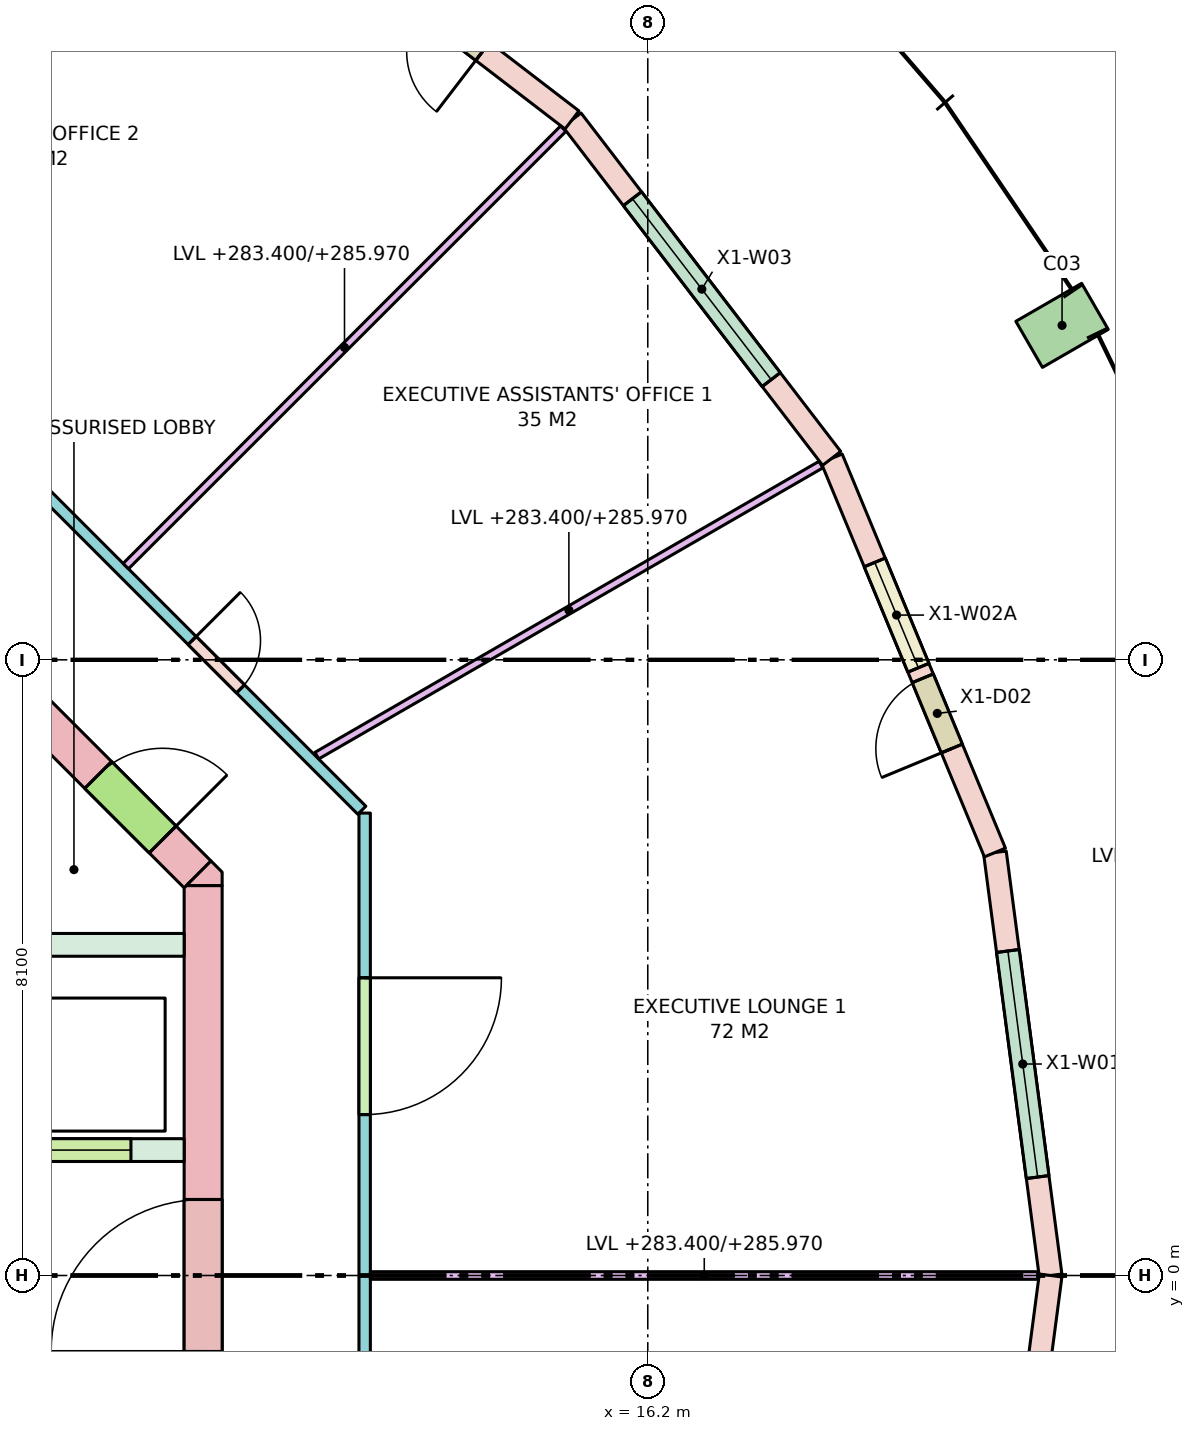
"""IFC4 building model, lengths in metres.
Left out: names, types, materials, properties, quantities, classifications, styles, units other than length and angle.
Written with IfcOpenShell. Run it as: python <this file> out.ifc"""

import sys

from ifc_helpers import new_model, si_unit, direction, frame, frame_2d, origin, origin_2d, place, context, subcontext, project, spatial, polyline, rectangle, outline, extrude, element, fill, save


model = new_model("IFC4")
c1 = context("Model", 3, precision=1e-05, world=origin(), true_north=direction((0.0, 1.0)))
c2 = subcontext(c1, "Body", "Model", "MODEL_VIEW")
j1 = project(units=[si_unit("LENGTHUNIT", "METRE"), si_unit("PLANEANGLEUNIT", "RADIAN")], contexts=[c1])
p1 = place(None, origin())
s1 = spatial("IfcSite", under=j1, at=p1, CompositionType="ELEMENT")
p2 = place(p1, origin())
s2 = spatial("IfcBuilding", under=s1, at=p2, CompositionType="ELEMENT")
p3 = place(p2, frame((0.0, 0.0, 283.4)))
s3 = spatial("IfcBuildingStorey", under=s2, at=p3, CompositionType="ELEMENT", Elevation=283.4)
p4 = place(p3, frame((21.651, 12.5, 0.0), z_axis=(0.0, 0.0, 1.0), x_axis=(-0.5, 0.866025403784, 0.0)))
e1 = element("IfcColumn", 1, at=p4, inside=s3, PredefinedType="COLUMN", context=c2, shape_type="SweptSolid", body=[
    extrude(rectangle(XDim=0.7, YDim=1.0, at=origin_2d()), origin(), (0.0, 0.0, 1.0), 3.7),
])
p5 = place(p3, frame((10.35, -5.13, -0.28), z_axis=(0.0, 0.0, 1.0), x_axis=(0.0, 1.0, 0.0)))
e2 = element("IfcWall", 2, at=p5, inside=s3, PredefinedType="SHEAR", context=c2, shape_type="SweptSolid", body=[
    extrude(rectangle(XDim=10.26, YDim=0.5, at=frame_2d((5.13, 0.0))), origin(), (0.0, 0.0, 1.0), 3.7),
])
p6 = place(p5, frame((4.13, 0.0, 0.28)))
e3 = element("IfcOpeningElement", 3, at=p6, cuts=e2, PredefinedType="OPENING", context=c2, shape_type="SweptSolid", body=[
    extrude(rectangle(XDim=2.0, YDim=2.1, at=frame_2d((1.0, 1.05))), frame((0.0, 0.26, 0.0), z_axis=(0.0, -1.0, 0.0), x_axis=(1.0, 0.0, 0.0)), (0.0, 0.0, 1.0), 0.52),
])
p7 = place(p3, frame((7.277, 8.277, -0.28), z_axis=(0.0, 0.0, 1.0), x_axis=(0.707106781187, -0.707106781187, 0.0)))
e4 = element("IfcWall", 4, at=p7, inside=s3, PredefinedType="SHEAR", context=c2, shape_type="SweptSolid", body=[
    extrude(rectangle(XDim=4.243, YDim=0.5, at=frame_2d((2.121, 0.0))), origin(), (0.0, 0.0, 1.0), 3.7),
])
p8 = place(p7, frame((2.393, 0.0, 0.28)))
e5 = element("IfcOpeningElement", 5, at=p8, cuts=e4, PredefinedType="OPENING", context=c2, shape_type="SweptSolid", body=[
    extrude(rectangle(XDim=1.2, YDim=2.1, at=frame_2d((0.6, 1.05))), frame((0.0, 0.26, 0.0), z_axis=(0.0, -1.0, 0.0), x_axis=(1.0, 0.0, 0.0)), (0.0, 0.0, 1.0), 0.52),
])
p9 = place(p3, frame((0.0, 0.0, -0.28)))
e6 = element("IfcWall", 6, at=p9, inside=s3, PredefinedType="SHEAR", context=c2, shape_type="SweptSolid", body=[
    extrude(outline(polyline([(10.6, 5.307), (10.6, 5.13), (10.13, 5.13), (10.454, 5.454), (10.6, 5.307)])), origin(), (0.0, 0.0, 1.0), 3.7),
])
p10 = place(p3, frame((2.0, 4.35, 0.0), z_axis=(0.0, 0.0, 1.0), x_axis=(1.0, 0.0, 0.0)))
e7 = element("IfcWall", 7, at=p10, inside=s3, PredefinedType="SOLIDWALL", context=c2, shape_type="SweptSolid", body=[
    extrude(rectangle(XDim=8.1, YDim=0.3, at=frame_2d((4.05, 0.0))), origin(), (0.0, 0.0, 1.0), 3.42),
])
p11 = place(p3, frame((2.0, 1.65, 0.0), z_axis=(0.0, 0.0, 1.0), x_axis=(1.0, 0.0, 0.0)))
e8 = element("IfcWall", 8, at=p11, inside=s3, PredefinedType="SOLIDWALL", context=c2, shape_type="SweptSolid", body=[
    extrude(rectangle(XDim=8.1, YDim=0.3, at=frame_2d((4.05, 0.0))), origin(), (0.0, 0.0, 1.0), 3.42),
])
p12 = place(p11, frame((0.85, 0.0, 0.0)))
e9 = element("IfcOpeningElement", 9, at=p12, cuts=e8, PredefinedType="OPENING", context=c2, shape_type="SweptSolid", body=[
    extrude(rectangle(XDim=1.1, YDim=2.1, at=frame_2d((0.55, 1.05))), frame((0.0, 0.16, 0.0), z_axis=(0.0, -1.0, 0.0), x_axis=(1.0, 0.0, 0.0)), (0.0, 0.0, 1.0), 0.32),
])
p13 = place(p11, frame((3.5, 0.0, 0.0)))
e10 = element("IfcOpeningElement", 10, at=p13, cuts=e8, PredefinedType="OPENING", context=c2, shape_type="SweptSolid", body=[
    extrude(rectangle(XDim=1.1, YDim=2.1, at=frame_2d((0.55, 1.05))), frame((0.0, 0.16, 0.0), z_axis=(0.0, -1.0, 0.0), x_axis=(1.0, 0.0, 0.0)), (0.0, 0.0, 1.0), 0.32),
])
p14 = place(p11, frame((6.3, 0.0, 0.0)))
e11 = element("IfcOpeningElement", 11, at=p14, cuts=e8, PredefinedType="OPENING", context=c2, shape_type="SweptSolid", body=[
    extrude(rectangle(XDim=1.1, YDim=2.1, at=frame_2d((0.55, 1.05))), frame((0.0, 0.16, 0.0), z_axis=(0.0, -1.0, 0.0), x_axis=(1.0, 0.0, 0.0)), (0.0, 0.0, 1.0), 0.32),
])
p15 = place(p3, frame((21.5, 0.0, 0.0), z_axis=(0.0, 0.0, 1.0), x_axis=(-0.130536651449, 0.991443484334, 0.0)))
e12 = element("IfcWall", 12, at=p15, inside=s3, PredefinedType="STANDARD", context=c2, shape_type="SweptSolid", body=[
    extrude(rectangle(XDim=5.613, YDim=0.3, at=frame_2d((2.806, 0.0))), origin(), (0.0, 0.0, 1.0), 3.42),
])
p16 = place(p15, frame((1.306, 0.0, 0.8)))
e13 = element("IfcOpeningElement", 13, at=p16, cuts=e12, PredefinedType="OPENING", context=c2, shape_type="SweptSolid", body=[
    extrude(rectangle(XDim=3.0, YDim=2.4, at=frame_2d((1.5, 1.2))), frame((0.0, 0.16, 0.0), z_axis=(0.0, -1.0, 0.0), x_axis=(1.0, 0.0, 0.0)), (0.0, 0.0, 1.0), 0.32),
])
p17 = place(p3, frame((20.767, 5.565, 0.0), z_axis=(0.0, 0.0, 1.0), x_axis=(-0.382702670405, 0.92387156362, 0.0)))
e14 = element("IfcWall", 14, at=p17, inside=s3, PredefinedType="STANDARD", context=c2, shape_type="SweptSolid", body=[
    extrude(rectangle(XDim=5.613, YDim=0.3, at=frame_2d((2.806, 0.0))), origin(), (0.0, 0.0, 1.0), 3.42),
])
p18 = place(p17, frame((1.481, 0.0, 0.0)))
e15 = element("IfcOpeningElement", 15, at=p18, cuts=e14, PredefinedType="OPENING", context=c2, shape_type="SweptSolid", body=[
    extrude(rectangle(XDim=1.0, YDim=2.4, at=frame_2d((0.5, 1.2))), frame((0.0, 0.16, 0.0), z_axis=(0.0, -1.0, 0.0), x_axis=(1.0, 0.0, 0.0)), (0.0, 0.0, 1.0), 0.32),
])
p19 = place(p17, frame((2.631, 0.0, 0.8)))
e16 = element("IfcOpeningElement", 16, at=p19, cuts=e14, PredefinedType="OPENING", context=c2, shape_type="SweptSolid", body=[
    extrude(rectangle(XDim=1.5, YDim=2.4, at=frame_2d((0.75, 1.2))), frame((0.0, 0.16, 0.0), z_axis=(0.0, -1.0, 0.0), x_axis=(1.0, 0.0, 0.0)), (0.0, 0.0, 1.0), 0.32),
])
p20 = place(p3, frame((18.619, 10.75, 0.0), z_axis=(0.0, 0.0, 1.0), x_axis=(-0.608726467567, 0.793380165925, 0.0)))
e17 = element("IfcWall", 17, at=p20, inside=s3, PredefinedType="STANDARD", context=c2, shape_type="SweptSolid", body=[
    extrude(rectangle(XDim=5.613, YDim=0.3, at=frame_2d((2.806, 0.0))), origin(), (0.0, 0.0, 1.0), 3.42),
])
p21 = place(p20, frame((1.306, 0.0, 0.8)))
e18 = element("IfcOpeningElement", 18, at=p21, cuts=e17, PredefinedType="OPENING", context=c2, shape_type="SweptSolid", body=[
    extrude(rectangle(XDim=3.0, YDim=2.4, at=frame_2d((1.5, 1.2))), frame((0.0, 0.16, 0.0), z_axis=(0.0, -1.0, 0.0), x_axis=(1.0, 0.0, 0.0)), (0.0, 0.0, 1.0), 0.32),
])
p22 = place(p3, frame((15.203, 15.203, 0.0), z_axis=(0.0, 0.0, 1.0), x_axis=(-0.793380165925, 0.608726467567, 0.0)))
e19 = element("IfcWall", 19, at=p22, inside=s3, PredefinedType="STANDARD", context=c2, shape_type="SweptSolid", body=[
    extrude(rectangle(XDim=5.613, YDim=0.3, at=frame_2d((2.806, 0.0))), origin(), (0.0, 0.0, 1.0), 3.42),
])
p23 = place(p22, frame((1.481, 0.0, 0.0)))
e20 = element("IfcOpeningElement", 20, at=p23, cuts=e19, PredefinedType="OPENING", context=c2, shape_type="SweptSolid", body=[
    extrude(rectangle(XDim=1.0, YDim=2.4, at=frame_2d((0.5, 1.2))), frame((0.0, 0.16, 0.0), z_axis=(0.0, -1.0, 0.0), x_axis=(1.0, 0.0, 0.0)), (0.0, 0.0, 1.0), 0.32),
])
p24 = place(p22, frame((2.631, 0.0, 0.8)))
e21 = element("IfcOpeningElement", 21, at=p24, cuts=e19, PredefinedType="OPENING", context=c2, shape_type="SweptSolid", body=[
    extrude(rectangle(XDim=1.5, YDim=2.4, at=frame_2d((0.75, 1.2))), frame((0.0, 0.16, 0.0), z_axis=(0.0, -1.0, 0.0), x_axis=(1.0, 0.0, 0.0)), (0.0, 0.0, 1.0), 0.32),
])
p25 = place(p3, frame((20.767, -5.565, 0.0), z_axis=(0.0, 0.0, 1.0), x_axis=(0.130536651449, 0.991443484334, 0.0)))
e22 = element("IfcWall", 22, at=p25, inside=s3, PredefinedType="STANDARD", context=c2, shape_type="SweptSolid", body=[
    extrude(rectangle(XDim=5.613, YDim=0.3, at=frame_2d((2.806, 0.0))), origin(), (0.0, 0.0, 1.0), 3.42),
])
p26 = place(p25, frame((1.481, 0.0, 0.0)))
e23 = element("IfcOpeningElement", 23, at=p26, cuts=e22, PredefinedType="OPENING", context=c2, shape_type="SweptSolid", body=[
    extrude(rectangle(XDim=1.0, YDim=2.4, at=frame_2d((0.5, 1.2))), frame((0.0, 0.16, 0.0), z_axis=(0.0, -1.0, 0.0), x_axis=(1.0, 0.0, 0.0)), (0.0, 0.0, 1.0), 0.32),
])
p27 = place(p25, frame((2.631, 0.0, 0.8)))
e24 = element("IfcOpeningElement", 24, at=p27, cuts=e22, PredefinedType="OPENING", context=c2, shape_type="SweptSolid", body=[
    extrude(rectangle(XDim=1.5, YDim=2.4, at=frame_2d((0.75, 1.2))), frame((0.0, 0.16, 0.0), z_axis=(0.0, -1.0, 0.0), x_axis=(1.0, 0.0, 0.0)), (0.0, 0.0, 1.0), 0.32),
])
p28 = place(p3, frame((8.121, 10.438, 0.0), z_axis=(0.0, 0.0, 1.0), x_axis=(0.707106781187, -0.707106781187, 0.0)))
e25 = element("IfcWall", 25, at=p28, inside=s3, PredefinedType="PARTITIONING", context=c2, shape_type="SweptSolid", body=[
    extrude(rectangle(XDim=6.105, YDim=0.15, at=frame_2d((3.053, 0.0))), origin(), (0.0, 0.0, 1.0), 2.57),
])
p29 = place(p28, frame((2.948, 0.0, 0.0)))
e26 = element("IfcOpeningElement", 26, at=p29, cuts=e25, PredefinedType="OPENING", context=c2, shape_type="SweptSolid", body=[
    extrude(rectangle(XDim=0.9, YDim=2.1, at=frame_2d((0.45, 1.05))), frame((0.0, 0.085, 0.0), z_axis=(0.0, -1.0, 0.0), x_axis=(1.0, 0.0, 0.0)), (0.0, 0.0, 1.0), 0.17),
])
p30 = place(p3, frame((12.475, 6.084, 0.0), z_axis=(0.0, 0.0, 1.0), x_axis=(0.0, -1.0, 0.0)))
e27 = element("IfcWall", 27, at=p30, inside=s3, PredefinedType="PARTITIONING", context=c2, shape_type="SweptSolid", body=[
    extrude(rectangle(XDim=12.167, YDim=0.15, at=frame_2d((6.084, 0.0))), origin(), (0.0, 0.0, 1.0), 2.57),
])
p31 = place(p30, frame((8.601, 0.0, 0.0)))
e28 = element("IfcOpeningElement", 28, at=p31, cuts=e27, PredefinedType="OPENING", context=c2, shape_type="SweptSolid", body=[
    extrude(rectangle(XDim=1.0, YDim=2.1, at=frame_2d((0.5, 1.05))), frame((0.0, 0.085, 0.0), z_axis=(0.0, -1.0, 0.0), x_axis=(1.0, 0.0, 0.0)), (0.0, 0.0, 1.0), 0.17),
])
p32 = place(p30, frame((2.167, 0.0, 0.0)))
e29 = element("IfcOpeningElement", 29, at=p32, cuts=e27, PredefinedType="OPENING", context=c2, shape_type="SweptSolid", body=[
    extrude(rectangle(XDim=1.8, YDim=2.1, at=frame_2d((0.9, 1.05))), frame((0.0, 0.085, 0.0), z_axis=(0.0, -1.0, 0.0), x_axis=(1.0, 0.0, 0.0)), (0.0, 0.0, 1.0), 0.17),
])
p33 = place(p3, frame((12.55, 0.0, 0.0), z_axis=(0.0, 0.0, 1.0), x_axis=(1.0, 0.0, 0.0)))
e30 = element("IfcWall", 30, at=p33, inside=s3, PredefinedType="PARTITIONING", context=c2, shape_type="SweptSolid", body=[
    extrude(rectangle(XDim=8.787, YDim=0.1, at=frame_2d((4.393, 0.0))), origin(), (0.0, 0.0, 1.0), 2.57),
])
p34 = place(p3, frame((11.846, 6.839, 0.0), z_axis=(0.0, 0.0, 1.0), x_axis=(0.866007734672, 0.500030602552, 0.0)))
e31 = element("IfcWall", 31, at=p34, inside=s3, PredefinedType="PARTITIONING", context=c2, shape_type="SweptSolid", body=[
    extrude(rectangle(XDim=7.658, YDim=0.1, at=frame_2d((3.829, 0.0))), origin(), (0.0, 0.0, 1.0), 2.57),
])
p35 = place(p3, frame((9.333, 9.333, 0.0), z_axis=(0.0, 0.0, 1.0), x_axis=(0.707106781187, 0.707106781187, 0.0)))
e32 = element("IfcWall", 32, at=p35, inside=s3, PredefinedType="PARTITIONING", context=c2, shape_type="SweptSolid", body=[
    extrude(rectangle(XDim=8.139, YDim=0.1, at=frame_2d((4.069, 0.0))), origin(), (0.0, 0.0, 1.0), 2.57),
])
p36 = place(p16, origin())
e33 = element("IfcWindow", 33, at=p36, inside=s3, PartitioningType="SINGLE_PANEL", PredefinedType="WINDOW", context=c2, shape_type="SweptSolid", body=[
    extrude(rectangle(XDim=3.0, YDim=2.4, at=frame_2d((1.5, 1.2))), frame((0.0, 0.03, 0.0), z_axis=(0.0, -1.0, 0.0), x_axis=(1.0, 0.0, 0.0)), (0.0, 0.0, 1.0), 0.06),
])
fill(e13, e33)
p37 = place(p18, origin())
e34 = element("IfcDoor", 34, at=p37, inside=s3, OperationType="SINGLE_SWING_LEFT", PredefinedType="DOOR", context=c2, shape_type="SweptSolid", body=[
    extrude(rectangle(XDim=1.0, YDim=2.4, at=frame_2d((0.5, 1.2))), frame((0.0, 0.025, 0.0), z_axis=(0.0, -1.0, 0.0), x_axis=(1.0, 0.0, 0.0)), (0.0, 0.0, 1.0), 0.05),
])
fill(e15, e34)
p38 = place(p19, origin())
e35 = element("IfcWindow", 35, at=p38, inside=s3, PartitioningType="SINGLE_PANEL", PredefinedType="WINDOW", context=c2, shape_type="SweptSolid", body=[
    extrude(rectangle(XDim=1.5, YDim=2.4, at=frame_2d((0.75, 1.2))), frame((0.0, 0.03, 0.0), z_axis=(0.0, -1.0, 0.0), x_axis=(1.0, 0.0, 0.0)), (0.0, 0.0, 1.0), 0.06),
])
fill(e16, e35)
p39 = place(p21, origin())
e36 = element("IfcWindow", 36, at=p39, inside=s3, PartitioningType="SINGLE_PANEL", PredefinedType="WINDOW", context=c2, shape_type="SweptSolid", body=[
    extrude(rectangle(XDim=3.0, YDim=2.4, at=frame_2d((1.5, 1.2))), frame((0.0, 0.03, 0.0), z_axis=(0.0, -1.0, 0.0), x_axis=(1.0, 0.0, 0.0)), (0.0, 0.0, 1.0), 0.06),
])
fill(e18, e36)
p40 = place(p23, origin())
e37 = element("IfcDoor", 37, at=p40, inside=s3, OperationType="SINGLE_SWING_LEFT", PredefinedType="DOOR", context=c2, shape_type="SweptSolid", body=[
    extrude(rectangle(XDim=1.0, YDim=2.4, at=frame_2d((0.5, 1.2))), frame((0.0, 0.025, 0.0), z_axis=(0.0, -1.0, 0.0), x_axis=(1.0, 0.0, 0.0)), (0.0, 0.0, 1.0), 0.05),
])
fill(e20, e37)
p41 = place(p14, origin())
e38 = element("IfcDoor", 38, at=p41, inside=s3, OperationType="DOUBLE_DOOR_SLIDING", PredefinedType="DOOR", context=c2, shape_type="SweptSolid", body=[
    extrude(rectangle(XDim=1.1, YDim=2.1, at=frame_2d((0.55, 1.05))), frame((0.0, 0.025, 0.0), z_axis=(0.0, -1.0, 0.0), x_axis=(1.0, 0.0, 0.0)), (0.0, 0.0, 1.0), 0.05),
])
fill(e11, e38)
p42 = place(p8, origin())
e39 = element("IfcDoor", 39, at=p42, inside=s3, OperationType="SINGLE_SWING_RIGHT", PredefinedType="DOOR", context=c2, shape_type="SweptSolid", body=[
    extrude(rectangle(XDim=1.2, YDim=2.1, at=frame_2d((0.6, 1.05))), frame((0.0, 0.025, 0.0), z_axis=(0.0, -1.0, 0.0), x_axis=(1.0, 0.0, 0.0)), (0.0, 0.0, 1.0), 0.05),
])
fill(e5, e39)
p43 = place(p6, origin())
e40 = element("IfcDoor", 40, at=p43, inside=s3, OperationType="DOUBLE_DOOR_SINGLE_SWING", PredefinedType="DOOR", context=c2, shape_type="SweptSolid", body=[
    extrude(rectangle(XDim=2.0, YDim=2.1, at=frame_2d((1.0, 1.05))), frame((0.0, 0.025, 0.0), z_axis=(0.0, -1.0, 0.0), x_axis=(1.0, 0.0, 0.0)), (0.0, 0.0, 1.0), 0.05),
])
fill(e3, e40)
p44 = place(p32, origin())
e41 = element("IfcDoor", 41, at=p44, inside=s3, OperationType="DOUBLE_DOOR_SINGLE_SWING", PredefinedType="DOOR", context=c2, shape_type="SweptSolid", body=[
    extrude(rectangle(XDim=1.8, YDim=2.1, at=frame_2d((0.9, 1.05))), frame((0.0, 0.025, 0.0), z_axis=(0.0, -1.0, 0.0), x_axis=(1.0, 0.0, 0.0)), (0.0, 0.0, 1.0), 0.05),
])
fill(e29, e41)
p45 = place(p29, origin())
e42 = element("IfcDoor", 42, at=p45, inside=s3, OperationType="SINGLE_SWING_LEFT", PredefinedType="DOOR", context=c2, shape_type="SweptSolid", body=[
    extrude(rectangle(XDim=0.9, YDim=2.1, at=frame_2d((0.45, 1.05))), frame((0.0, 0.025, 0.0), z_axis=(0.0, -1.0, 0.0), x_axis=(1.0, 0.0, 0.0)), (0.0, 0.0, 1.0), 0.05),
])
fill(e26, e42)
save(model, sys.argv[1])
